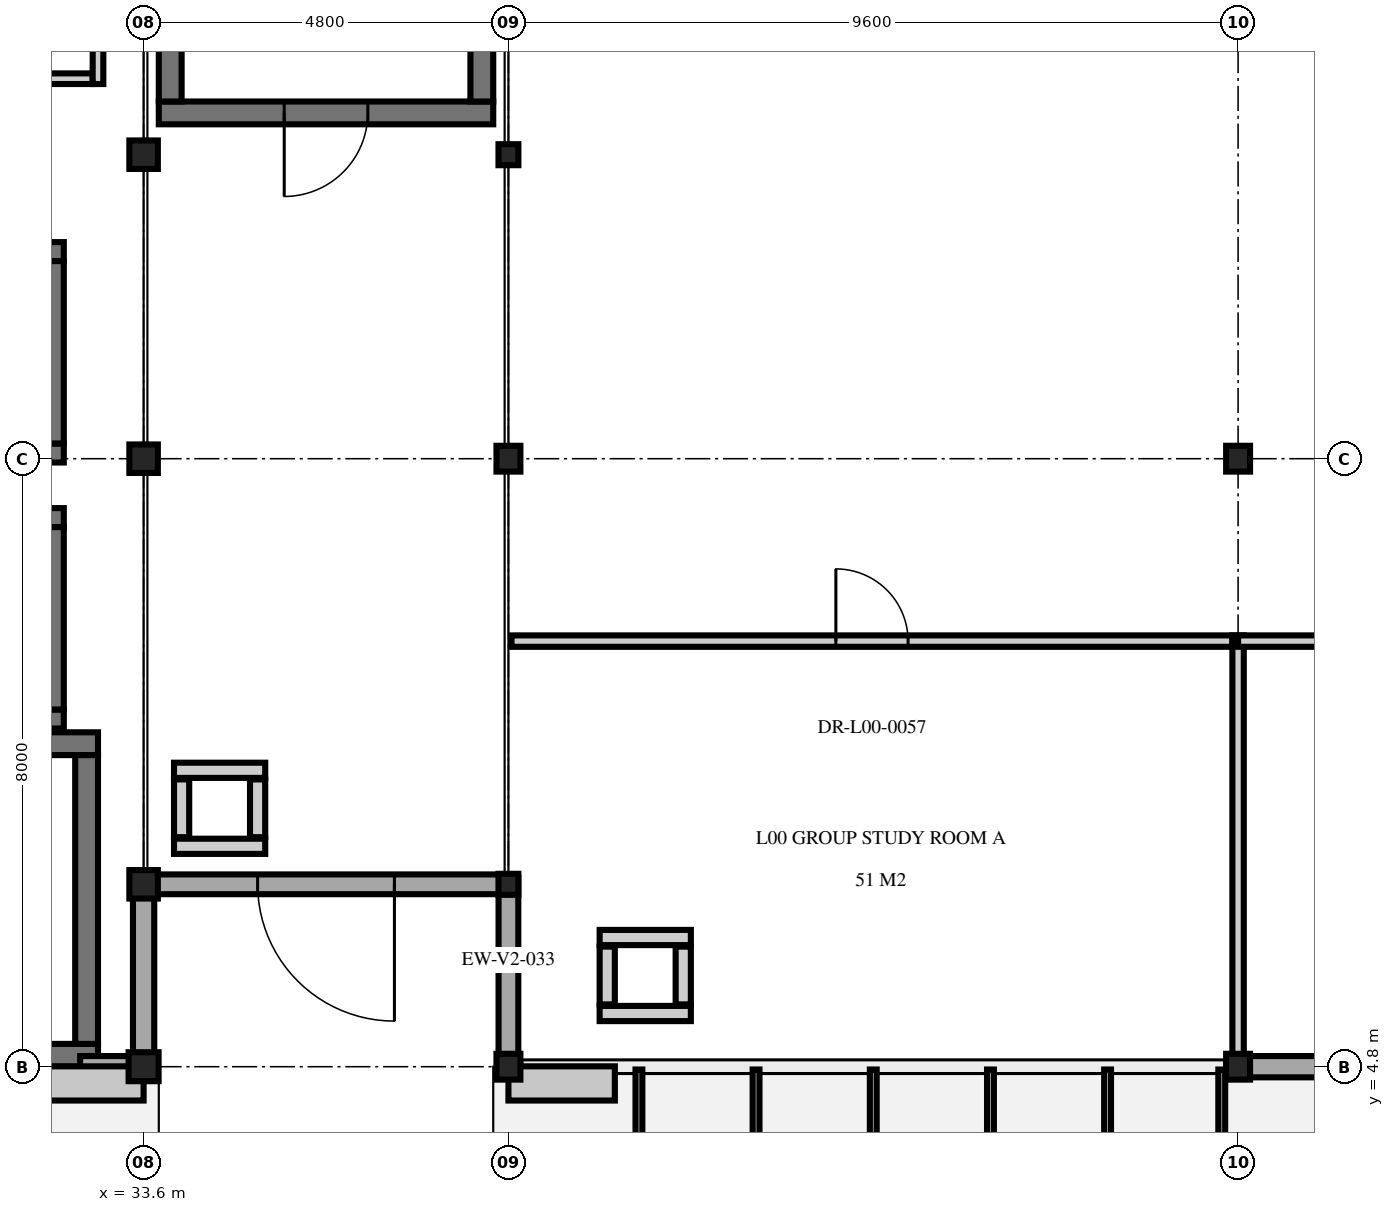
"""IFC4 building model, lengths in metres.
Left out: names, types, materials, properties, quantities, classifications, styles, units other than length and angle.
Written with IfcOpenShell. Run it as: python <this file> out.ifc"""

import sys

from ifc_helpers import new_model, si_unit, direction, frame, frame_2d, origin, origin_2d, place, context, subcontext, project, spatial, rectangle, i_section, extrude, element, fill, save


model = new_model("IFC4")
c1 = context("Model", 3, precision=1e-05, world=origin(), true_north=direction((0.0, 1.0)))
c2 = subcontext(c1, "Body", "Model", "MODEL_VIEW")
j1 = project(units=[si_unit("LENGTHUNIT", "METRE"), si_unit("PLANEANGLEUNIT", "RADIAN")], contexts=[c1])
p1 = place(None, origin())
s1 = spatial("IfcSite", under=j1, at=p1, CompositionType="ELEMENT")
p2 = place(p1, origin())
s2 = spatial("IfcBuilding", under=s1, at=p2, CompositionType="ELEMENT")
p3 = place(p2, origin())
s3 = spatial("IfcBuildingStorey", under=s2, at=p3, CompositionType="ELEMENT", Elevation=0.0)
p4 = place(p3, frame((33.6, 4.8, 0.0), z_axis=(0.0, 0.0, 1.0), x_axis=(1.0, 0.0, 0.0)))
e1 = element("IfcColumn", 1, at=p4, inside=s3, PredefinedType="COLUMN", context=c2, shape_type="SweptSolid", body=[
    extrude(i_section(OverallWidth=0.395, OverallDepth=0.381, WebThickness=0.018, FlangeThickness=0.03, at=origin_2d()), origin(), (0.0, 0.0, 1.0), 5.1),
])
for number, where, z_axis, x_axis in (
    (2, (33.6, 7.2, 0.0), (0.0, 0.0, 1.0), (1.0, 0.0, 0.0)),
    (3, (33.6, 12.8, 0.0), (0.0, 0.0, 1.0), (1.0, 0.0, 0.0)),
    (4, (33.6, 16.8, 0.0), (0.0, 0.0, 1.0), (1.0, 0.0, 0.0)),
):
    element("IfcColumn", number, at=place(p3, frame(where, z_axis=z_axis, x_axis=x_axis)), inside=s3, PredefinedType="COLUMN", context=c2, shape_type="SweptSolid", body=[
        extrude(i_section(OverallWidth=0.375, OverallDepth=0.375, WebThickness=0.017, FlangeThickness=0.027, at=origin_2d()), origin(), (0.0, 0.0, 1.0), 5.1),
    ])
for number, where, z_axis, x_axis in (
    (5, (38.4, 4.8, 0.0), (0.0, 0.0, 1.0), (1.0, 0.0, 0.0)),
    (6, (38.4, 12.8, 0.0), (0.0, 0.0, 1.0), (1.0, 0.0, 0.0)),
    (7, (48.0, 4.8, 0.0), (0.0, 0.0, 1.0), (1.0, 0.0, 0.0)),
    (8, (48.0, 12.8, 0.0), (0.0, 0.0, 1.0), (1.0, 0.0, 0.0)),
):
    element("IfcColumn", number, at=place(p3, frame(where, z_axis=z_axis, x_axis=x_axis)), inside=s3, PredefinedType="COLUMN", context=c2, shape_type="SweptSolid", body=[
        extrude(i_section(OverallWidth=0.314, OverallDepth=0.34, WebThickness=0.019, FlangeThickness=0.031, at=origin_2d()), origin(), (0.0, 0.0, 1.0), 5.1),
    ])
for number, where, z_axis, x_axis in (
    (9, (38.4, 7.2, 0.0), (0.0, 0.0, 1.0), (1.0, 0.0, 0.0)),
    (10, (38.4, 16.8, 0.0), (0.0, 0.0, 1.0), (1.0, 0.0, 0.0)),
):
    element("IfcColumn", number, at=place(p3, frame(where, z_axis=z_axis, x_axis=x_axis)), inside=s3, PredefinedType="COLUMN", context=c2, shape_type="SweptSolid", body=[
        extrude(i_section(OverallWidth=0.261, OverallDepth=0.276, WebThickness=0.015, FlangeThickness=0.025, at=origin_2d()), origin(), (0.0, 0.0, 1.0), 5.1),
    ])
p5 = place(p3, frame((33.0, 4.95, 0.0), z_axis=(0.0, 0.0, 1.0), x_axis=(-1.0, 0.0, 0.0)))
e11 = element("IfcWall", 11, at=p5, inside=s3, PredefinedType="SHEAR", context=c2, shape_type="SweptSolid", body=[
    extrude(rectangle(XDim=8.4, YDim=0.3, at=frame_2d((4.2, 0.0))), origin(), (0.0, 0.0, 1.0), 4.88),
])
p6 = place(p5, frame((6.05, 0.0, 0.0)))
e12 = element("IfcOpeningElement", 12, at=p6, cuts=e11, PredefinedType="OPENING", context=c2, shape_type="SweptSolid", body=[
    extrude(rectangle(XDim=2.0, YDim=2.4, at=frame_2d((1.0, 1.2))), frame((0.0, 0.16, 0.0), z_axis=(0.0, -1.0, 0.0), x_axis=(1.0, 0.0, 0.0)), (0.0, 0.0, 1.0), 0.32),
])
p7 = place(p3, frame((24.6, 9.05, 0.0), z_axis=(0.0, 0.0, 1.0), x_axis=(1.0, 0.0, 0.0)))
e13 = element("IfcWall", 13, at=p7, inside=s3, PredefinedType="SHEAR", context=c2, shape_type="SweptSolid", body=[
    extrude(rectangle(XDim=8.4, YDim=0.3, at=frame_2d((4.2, 0.0))), origin(), (0.0, 0.0, 1.0), 4.88),
])
p8 = place(p7, frame((0.65, 0.0, 0.0)))
e14 = element("IfcOpeningElement", 14, at=p8, cuts=e13, PredefinedType="OPENING", context=c2, shape_type="SweptSolid", body=[
    extrude(rectangle(XDim=1.1, YDim=2.2, at=frame_2d((0.55, 1.1))), frame((0.0, 0.16, 0.0), z_axis=(0.0, -1.0, 0.0), x_axis=(1.0, 0.0, 0.0)), (0.0, 0.0, 1.0), 0.32),
])
p9 = place(p3, frame((32.85, 8.9, 0.0), z_axis=(0.0, 0.0, 1.0), x_axis=(0.0, -1.0, 0.0)))
e15 = element("IfcWall", 15, at=p9, inside=s3, PredefinedType="SHEAR", context=c2, shape_type="SweptSolid", body=[
    extrude(rectangle(XDim=3.8, YDim=0.3, at=frame_2d((1.9, 0.0))), origin(), (0.0, 0.0, 1.0), 4.88),
])
p10 = place(p3, frame((38.2, 17.35, 0.0), z_axis=(0.0, 0.0, 1.0), x_axis=(-1.0, 0.0, 0.0)))
e16 = element("IfcWall", 16, at=p10, inside=s3, PredefinedType="SHEAR", context=c2, shape_type="SweptSolid", body=[
    extrude(rectangle(XDim=4.4, YDim=0.3, at=frame_2d((2.2, 0.0))), origin(), (0.0, 0.0, 1.0), 4.88),
])
p11 = place(p10, frame((1.65, 0.0, 0.0)))
e17 = element("IfcOpeningElement", 17, at=p11, cuts=e16, PredefinedType="OPENING", context=c2, shape_type="SweptSolid", body=[
    extrude(rectangle(XDim=1.1, YDim=2.2, at=frame_2d((0.55, 1.1))), frame((0.0, 0.16, 0.0), z_axis=(0.0, -1.0, 0.0), x_axis=(1.0, 0.0, 0.0)), (0.0, 0.0, 1.0), 0.32),
])
for number, where, z_axis, x_axis in (
    (18, (33.95, 17.5, 0.0), (0.0, 0.0, 1.0), (0.0, 1.0, 0.0)),
    (19, (38.05, 25.3, 0.0), (0.0, 0.0, 1.0), (0.0, -1.0, 0.0)),
):
    element("IfcWall", number, at=place(p3, frame(where, z_axis=z_axis, x_axis=x_axis)), inside=s3, PredefinedType="SHEAR", context=c2, shape_type="SweptSolid", body=[
        extrude(rectangle(XDim=7.8, YDim=0.3, at=frame_2d((3.9, 0.0))), origin(), (0.0, 0.0, 1.0), 4.88),
    ])
for number, where, z_axis, x_axis in (
    (20, (32.55, 9.375, 0.0), (0.0, 0.0, 1.0), (-1.0, 0.0, 0.0)),
    (21, (29.65, 12.025, 0.0), (0.0, 0.0, 1.0), (1.0, 0.0, 0.0)),
):
    element("IfcWall", number, at=place(p3, frame(where, z_axis=z_axis, x_axis=x_axis)), inside=s3, PredefinedType="SHEAR", context=c2, shape_type="SweptSolid", body=[
        extrude(rectangle(XDim=2.9, YDim=0.25, at=frame_2d((1.45, 0.0))), origin(), (0.0, 0.0, 1.0), 4.88),
    ])
p12 = place(p3, frame((32.425, 11.9, 0.0), z_axis=(0.0, 0.0, 1.0), x_axis=(0.0, -1.0, 0.0)))
e22 = element("IfcWall", 22, at=p12, inside=s3, PredefinedType="SHEAR", context=c2, shape_type="SweptSolid", body=[
    extrude(rectangle(XDim=2.4, YDim=0.25, at=frame_2d((1.2, 0.0))), origin(), (0.0, 0.0, 1.0), 4.88),
])
p13 = place(p3, frame((32.55, 12.875, 0.0), z_axis=(0.0, 0.0, 1.0), x_axis=(-1.0, 0.0, 0.0)))
e23 = element("IfcWall", 23, at=p13, inside=s3, PredefinedType="SHEAR", context=c2, shape_type="SweptSolid", body=[
    extrude(rectangle(XDim=2.9, YDim=0.25, at=frame_2d((1.45, 0.0))), origin(), (0.0, 0.0, 1.0), 4.88),
])
p14 = place(p3, frame((29.65, 15.525, 0.0), z_axis=(0.0, 0.0, 1.0), x_axis=(1.0, 0.0, 0.0)))
e24 = element("IfcWall", 24, at=p14, inside=s3, PredefinedType="SHEAR", context=c2, shape_type="SweptSolid", body=[
    extrude(rectangle(XDim=2.9, YDim=0.25, at=frame_2d((1.45, 0.0))), origin(), (0.0, 0.0, 1.0), 4.88),
])
p15 = place(p14, frame((0.75, 0.0, 0.0)))
e25 = element("IfcOpeningElement", 25, at=p15, cuts=e24, PredefinedType="OPENING", context=c2, shape_type="SweptSolid", body=[
    extrude(rectangle(XDim=1.4, YDim=2.2, at=frame_2d((0.7, 1.1))), frame((0.0, 0.135, 0.0), z_axis=(0.0, -1.0, 0.0), x_axis=(1.0, 0.0, 0.0)), (0.0, 0.0, 1.0), 0.27),
])
p16 = place(p3, frame((32.425, 15.4, 0.0), z_axis=(0.0, 0.0, 1.0), x_axis=(0.0, -1.0, 0.0)))
e26 = element("IfcWall", 26, at=p16, inside=s3, PredefinedType="SHEAR", context=c2, shape_type="SweptSolid", body=[
    extrude(rectangle(XDim=2.4, YDim=0.25, at=frame_2d((1.2, 0.0))), origin(), (0.0, 0.0, 1.0), 4.88),
])
for number, where, z_axis, x_axis in (
    (27, (40.8, 5.5, 0.0), (0.0, 0.0, 1.0), (-1.0, 0.0, 0.0)),
    (28, (39.6, 6.5, 0.0), (0.0, 0.0, 1.0), (1.0, 0.0, 0.0)),
):
    element("IfcWall", number, at=place(p3, frame(where, z_axis=z_axis, x_axis=x_axis)), inside=s3, PredefinedType="PARTITIONING", context=c2, shape_type="SweptSolid", body=[
        extrude(rectangle(XDim=1.2, YDim=0.2, at=frame_2d((0.6, 0.0))), origin(), (0.0, 0.0, 1.0), 4.38),
    ])
for number, where, z_axis, x_axis in (
    (29, (39.7, 5.62, 0.0), (0.0, 0.0, 1.0), (0.0, 1.0, 0.0)),
    (30, (40.7, 6.38, 0.0), (0.0, 0.0, 1.0), (0.0, -1.0, 0.0)),
):
    element("IfcWall", number, at=place(p3, frame(where, z_axis=z_axis, x_axis=x_axis)), inside=s3, PredefinedType="PARTITIONING", context=c2, shape_type="SweptSolid", body=[
        extrude(rectangle(XDim=0.76, YDim=0.2, at=frame_2d((0.38, 0.0))), origin(), (0.0, 0.0, 1.0), 4.38),
    ])
for number, where, z_axis, x_axis in (
    (31, (35.2, 7.7, 0.0), (0.0, 0.0, 1.0), (-1.0, 0.0, 0.0)),
    (32, (34.0, 8.7, 0.0), (0.0, 0.0, 1.0), (1.0, 0.0, 0.0)),
):
    element("IfcWall", number, at=place(p3, frame(where, z_axis=z_axis, x_axis=x_axis)), inside=s3, PredefinedType="PARTITIONING", context=c2, shape_type="SweptSolid", body=[
        extrude(rectangle(XDim=1.2, YDim=0.2, at=frame_2d((0.6, 0.0))), origin(), (0.0, 0.0, 1.0), 4.38),
    ])
for number, where, z_axis, x_axis in (
    (33, (34.1, 7.82, 0.0), (0.0, 0.0, 1.0), (0.0, 1.0, 0.0)),
    (34, (35.1, 8.58, 0.0), (0.0, 0.0, 1.0), (0.0, -1.0, 0.0)),
):
    element("IfcWall", number, at=place(p3, frame(where, z_axis=z_axis, x_axis=x_axis)), inside=s3, PredefinedType="PARTITIONING", context=c2, shape_type="SweptSolid", body=[
        extrude(rectangle(XDim=0.76, YDim=0.2, at=frame_2d((0.38, 0.0))), origin(), (0.0, 0.0, 1.0), 4.38),
    ])
p17 = place(p3, frame((33.685, 4.8, 0.0), z_axis=(0.0, 0.0, 1.0), x_axis=(-1.0, 0.0, 0.0)))
e35 = element("IfcWall", 35, at=p17, inside=s3, PredefinedType="SOLIDWALL", context=c2, shape_type="SweptSolid", body=[
    extrude(rectangle(XDim=0.92, YDim=0.28, at=frame_2d((0.46, 0.0))), origin(), (0.0, 0.0, 1.0), 4.305),
])
p18 = place(p3, frame((33.6, 7.285, 0.0), z_axis=(0.0, 0.0, 1.0), x_axis=(0.0, -1.0, 0.0)))
e36 = element("IfcWall", 36, at=p18, inside=s3, PredefinedType="SOLIDWALL", context=c2, shape_type="SweptSolid", body=[
    extrude(rectangle(XDim=2.57, YDim=0.28, at=frame_2d((1.285, 0.0))), origin(), (0.0, 0.0, 1.0), 4.305),
])
p19 = place(p3, frame((57.685, 4.8, 0.0), z_axis=(0.0, 0.0, 1.0), x_axis=(-1.0, 0.0, 0.0)))
e37 = element("IfcWall", 37, at=p19, inside=s3, PredefinedType="SOLIDWALL", context=c2, shape_type="SweptSolid", body=[
    extrude(rectangle(XDim=9.77, YDim=0.28, at=frame_2d((4.885, 0.0))), origin(), (0.0, 0.0, 1.0), 3.805),
])
p20 = place(p19, frame((3.685, 0.0, 0.0)))
e38 = element("IfcOpeningElement", 38, at=p20, cuts=e37, PredefinedType="OPENING", context=c2, shape_type="SweptSolid", body=[
    extrude(rectangle(XDim=2.4, YDim=2.6, at=frame_2d((1.2, 1.3))), frame((0.0, 0.15, 0.0), z_axis=(0.0, -1.0, 0.0), x_axis=(1.0, 0.0, 0.0)), (0.0, 0.0, 1.0), 0.3),
])
p21 = place(p3, frame((38.4, 4.715, 0.0), z_axis=(0.0, 0.0, 1.0), x_axis=(0.0, 1.0, 0.0)))
e39 = element("IfcWall", 39, at=p21, inside=s3, PredefinedType="SOLIDWALL", context=c2, shape_type="SweptSolid", body=[
    extrude(rectangle(XDim=2.57, YDim=0.26, at=frame_2d((1.285, 0.0))), origin(), (0.0, 0.0, 1.0), 4.315),
])
p22 = place(p3, frame((38.485, 7.2, 0.0), z_axis=(0.0, 0.0, 1.0), x_axis=(-1.0, 0.0, 0.0)))
e40 = element("IfcWall", 40, at=p22, inside=s3, PredefinedType="SOLIDWALL", context=c2, shape_type="SweptSolid", body=[
    extrude(rectangle(XDim=4.97, YDim=0.26, at=frame_2d((2.485, 0.0))), origin(), (0.0, 0.0, 1.0), 4.388),
])
p23 = place(p22, frame((1.585, 0.0, 0.0)))
e41 = element("IfcOpeningElement", 41, at=p23, cuts=e40, PredefinedType="OPENING", context=c2, shape_type="SweptSolid", body=[
    extrude(rectangle(XDim=1.8, YDim=2.4, at=frame_2d((0.9, 1.2))), frame((0.0, 0.14, 0.0), z_axis=(0.0, -1.0, 0.0), x_axis=(1.0, 0.0, 0.0)), (0.0, 0.0, 1.0), 0.28),
])
p24 = place(p3, frame((29.57, 17.8, 0.0), z_axis=(0.0, 0.0, 1.0), x_axis=(1.0, 0.0, 0.0)))
e42 = element("IfcWall", 42, at=p24, inside=s3, PredefinedType="PARTITIONING", context=c2, shape_type="SweptSolid", body=[
    extrude(rectangle(XDim=3.36, YDim=0.14, at=frame_2d((1.68, 0.0))), origin(), (0.0, 0.0, 1.0), 4.455),
])
p25 = place(p3, frame((33.0, 17.73, 0.0), z_axis=(0.0, 0.0, 1.0), x_axis=(0.0, 1.0, 0.0)))
e43 = element("IfcWall", 43, at=p25, inside=s3, PredefinedType="PARTITIONING", context=c2, shape_type="SweptSolid", body=[
    extrude(rectangle(XDim=4.24, YDim=0.14, at=frame_2d((2.12, 0.0))), origin(), (0.0, 0.0, 1.0), 4.305),
])
p26 = place(p3, frame((38.44, 10.4, 0.0), z_axis=(0.0, 0.0, 1.0), x_axis=(1.0, 0.0, 0.0)))
e44 = element("IfcWall", 44, at=p26, inside=s3, PredefinedType="PARTITIONING", context=c2, shape_type="SweptSolid", body=[
    extrude(rectangle(XDim=9.485, YDim=0.15, at=frame_2d((4.743, 0.0))), origin(), (0.0, 0.0, 1.0), 4.388),
])
p27 = place(p26, frame((4.268, 0.0, 0.0)))
e45 = element("IfcOpeningElement", 45, at=p27, cuts=e44, PredefinedType="OPENING", context=c2, shape_type="SweptSolid", body=[
    extrude(rectangle(XDim=0.95, YDim=2.15, at=frame_2d((0.475, 1.075))), frame((0.0, 0.085, 0.0), z_axis=(0.0, -1.0, 0.0), x_axis=(1.0, 0.0, 0.0)), (0.0, 0.0, 1.0), 0.17),
])
p28 = place(p3, frame((48.0, 4.84, 0.0), z_axis=(0.0, 0.0, 1.0), x_axis=(0.0, 1.0, 0.0)))
e46 = element("IfcWall", 46, at=p28, inside=s3, PredefinedType="PARTITIONING", context=c2, shape_type="SweptSolid", body=[
    extrude(rectangle(XDim=5.635, YDim=0.15, at=frame_2d((2.817, 0.0))), origin(), (0.0, 0.0, 1.0), 3.805),
])
p29 = place(p3, frame((48.0, 10.4, 0.0), z_axis=(0.0, 0.0, 1.0), x_axis=(1.0, 0.0, 0.0)))
e47 = element("IfcWall", 47, at=p29, inside=s3, PredefinedType="PARTITIONING", context=c2, shape_type="SweptSolid", body=[
    extrude(rectangle(XDim=9.525, YDim=0.15, at=frame_2d((4.762, 0.0))), origin(), (0.0, 0.0, 1.0), 4.388),
])
p30 = place(p29, frame((4.287, 0.0, 0.0)))
e48 = element("IfcOpeningElement", 48, at=p30, cuts=e47, PredefinedType="OPENING", context=c2, shape_type="SweptSolid", body=[
    extrude(rectangle(XDim=0.95, YDim=2.15, at=frame_2d((0.475, 1.075))), frame((0.0, 0.085, 0.0), z_axis=(0.0, -1.0, 0.0), x_axis=(1.0, 0.0, 0.0)), (0.0, 0.0, 1.0), 0.17),
])
p31 = place(p11, origin())
e49 = element("IfcDoor", 49, at=p31, inside=s3, OperationType="SINGLE_SWING_RIGHT", PredefinedType="DOOR", context=c2, shape_type="SweptSolid", body=[
    extrude(rectangle(XDim=1.1, YDim=2.2, at=frame_2d((0.55, 1.1))), frame((0.0, 0.025, 0.0), z_axis=(0.0, -1.0, 0.0), x_axis=(1.0, 0.0, 0.0)), (0.0, 0.0, 1.0), 0.05),
])
fill(e17, e49)
p32 = place(p23, origin())
e50 = element("IfcDoor", 50, at=p32, inside=s3, OperationType="SINGLE_SWING_LEFT", PredefinedType="DOOR", context=c2, shape_type="SweptSolid", body=[
    extrude(rectangle(XDim=1.8, YDim=2.4, at=frame_2d((0.9, 1.2))), frame((0.0, 0.025, 0.0), z_axis=(0.0, -1.0, 0.0), x_axis=(1.0, 0.0, 0.0)), (0.0, 0.0, 1.0), 0.05),
])
fill(e41, e50)
p33 = place(p27, origin())
e51 = element("IfcDoor", 51, at=p33, inside=s3, OperationType="SINGLE_SWING_LEFT", PredefinedType="DOOR", context=c2, shape_type="SweptSolid", body=[
    extrude(rectangle(XDim=0.95, YDim=2.15, at=frame_2d((0.475, 1.075))), frame((0.0, 0.025, 0.0), z_axis=(0.0, -1.0, 0.0), x_axis=(1.0, 0.0, 0.0)), (0.0, 0.0, 1.0), 0.05),
])
fill(e45, e51)
save(model, sys.argv[1])
